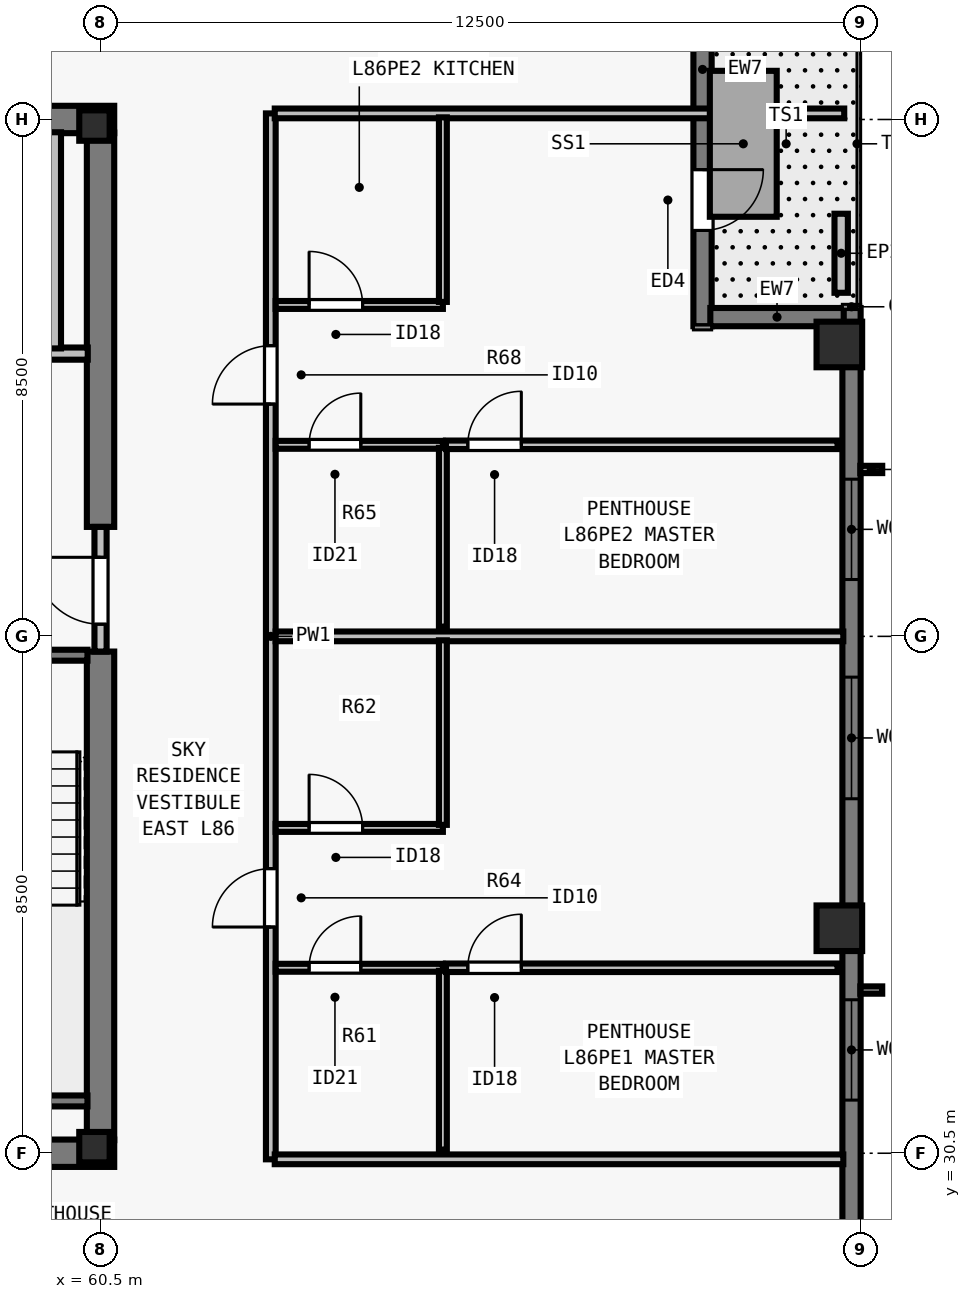
"""IFC4 building model, lengths in metres.
Left out: names, types, materials, properties, quantities, classifications, styles, units other than length and angle.
Written with IfcOpenShell. Run it as: python <this file> out.ifc"""

import sys

from ifc_helpers import new_model, si_unit, direction, frame, frame_2d, origin, origin_2d, place, context, subcontext, project, spatial, rectangle, i_section, extrude, element, fill, save


model = new_model("IFC4")
c1 = context("Model", 3, precision=1e-05, world=origin(), true_north=direction((0.0, 1.0)))
c2 = subcontext(c1, "Body", "Model", "MODEL_VIEW")
j1 = project(units=[si_unit("LENGTHUNIT", "METRE"), si_unit("PLANEANGLEUNIT", "RADIAN")], contexts=[c1])
p1 = place(None, origin())
s1 = spatial("IfcSite", under=j1, at=p1, CompositionType="ELEMENT")
p2 = place(p1, origin())
s2 = spatial("IfcBuilding", under=s1, at=p2, CompositionType="ELEMENT")
p3 = place(p2, frame((0.0, 0.0, 312.0)))
s3 = spatial("IfcBuildingStorey", under=s2, at=p3, CompositionType="ELEMENT", Elevation=312.0)
for number, where, z_axis, x_axis in (
    (1, (60.4, 30.6, 0.0), (0.0, 0.0, 1.0), (1.0, 0.0, 0.0)),
    (2, (60.4, 47.4, 0.0), (0.0, 0.0, 1.0), (1.0, 0.0, 0.0)),
):
    element("IfcColumn", number, at=place(p3, frame(where, z_axis=z_axis, x_axis=x_axis)), inside=s3, PredefinedType="COLUMN", context=c2, shape_type="SweptSolid", body=[
        extrude(i_section(OverallWidth=0.5, OverallDepth=0.5, WebThickness=0.028, FlangeThickness=0.045, at=origin_2d()), origin(), (0.0, 0.0, 1.0), 3.5),
    ])
for number, where, z_axis, x_axis in (
    (3, (72.65, 34.2, 0.0), (0.0, 0.0, 1.0), (0.0, 1.0, 0.0)),
    (4, (72.65, 43.8, 0.0), (0.0, 0.0, 1.0), (0.0, 1.0, 0.0)),
):
    element("IfcColumn", number, at=place(p3, frame(where, z_axis=z_axis, x_axis=x_axis)), inside=s3, PredefinedType="COLUMN", context=c2, shape_type="SweptSolid", body=[
        extrude(rectangle(XDim=0.75, YDim=0.75, at=origin_2d()), origin(), (0.0, 0.0, 1.0), 3.5),
    ])
p4 = place(p3, frame((72.85, 44.4, 0.0), z_axis=(0.0, 0.0, 1.0), x_axis=(0.0, -1.0, 0.0)))
e5 = element("IfcWall", 5, at=p4, inside=s3, PredefinedType="SOLIDWALL", context=c2, shape_type="SweptSolid", body=[
    extrude(rectangle(XDim=20.622, YDim=0.3, at=frame_2d((10.311, 0.0))), origin(), (0.0, 0.0, 1.0), 3.29),
])
p5 = place(p4, frame((2.815, 0.0, 0.8)))
e6 = element("IfcOpeningElement", 6, at=p5, cuts=e5, PredefinedType="OPENING", context=c2, shape_type="SweptSolid", body=[
    extrude(rectangle(XDim=1.65, YDim=1.758, at=frame_2d((0.825, 0.879))), frame((0.0, 0.16, 0.0), z_axis=(0.0, -1.0, 0.0), x_axis=(1.0, 0.0, 0.0)), (0.0, 0.0, 1.0), 0.32),
])
p6 = place(p4, frame((6.071, 0.0, 0.8)))
e7 = element("IfcOpeningElement", 7, at=p6, cuts=e5, PredefinedType="OPENING", context=c2, shape_type="SweptSolid", body=[
    extrude(rectangle(XDim=2.0, YDim=1.758, at=frame_2d((1.0, 0.879))), frame((0.0, 0.16, 0.0), z_axis=(0.0, -1.0, 0.0), x_axis=(1.0, 0.0, 0.0)), (0.0, 0.0, 1.0), 0.32),
])
p7 = place(p4, frame((11.376, 0.0, 0.8)))
e8 = element("IfcOpeningElement", 8, at=p7, cuts=e5, PredefinedType="OPENING", context=c2, shape_type="SweptSolid", body=[
    extrude(rectangle(XDim=1.65, YDim=1.758, at=frame_2d((0.825, 0.879))), frame((0.0, 0.16, 0.0), z_axis=(0.0, -1.0, 0.0), x_axis=(1.0, 0.0, 0.0)), (0.0, 0.0, 1.0), 0.32),
])
p8 = place(p3, frame((70.4, 49.822, 0.0), z_axis=(0.0, 0.0, 1.0), x_axis=(0.0, -1.0, 0.0)))
e9 = element("IfcWall", 9, at=p8, inside=s3, PredefinedType="SOLIDWALL", context=c2, shape_type="SweptSolid", body=[
    extrude(rectangle(XDim=5.722, YDim=0.3, at=frame_2d((2.861, 0.0))), origin(), (0.0, 0.0, 1.0), 3.29),
])
p9 = place(p8, frame((3.147, 0.0, 0.0)))
e10 = element("IfcOpeningElement", 10, at=p9, cuts=e9, PredefinedType="OPENING", context=c2, shape_type="SweptSolid", body=[
    extrude(rectangle(XDim=1.0, YDim=2.15, at=frame_2d((0.5, 1.075))), frame((0.0, 0.16, 0.0), z_axis=(0.0, -1.0, 0.0), x_axis=(1.0, 0.0, 0.0)), (0.0, 0.0, 1.0), 0.32),
])
p10 = place(p3, frame((70.528, 44.25, 0.0), z_axis=(0.0, 0.0, 1.0), x_axis=(1.0, 0.0, 0.0)))
e11 = element("IfcWall", 11, at=p10, inside=s3, PredefinedType="SOLIDWALL", context=c2, shape_type="SweptSolid", body=[
    extrude(rectangle(XDim=2.194, YDim=0.3, at=frame_2d((1.097, 0.0))), origin(), (0.0, 0.0, 1.0), 3.29),
])
p11 = place(p3, frame((72.68, 44.65, 0.0), z_axis=(0.0, 0.0, 1.0), x_axis=(0.0, 1.0, 0.0)))
e12 = element("IfcWall", 12, at=p11, inside=s3, PredefinedType="PARAPET", context=c2, shape_type="SweptSolid", body=[
    extrude(rectangle(XDim=1.3, YDim=0.22, at=frame_2d((0.65, 0.0))), origin(), (0.0, 0.0, 1.0), 0.55),
])
for number, where, z_axis, x_axis in (
    (13, (43.275, 30.5, 0.0), (0.0, 0.0, 1.0), (1.0, 0.0, 0.0)),
    (14, (43.275, 47.5, 0.0), (0.0, 0.0, 1.0), (1.0, 0.0, 0.0)),
):
    element("IfcWall", number, at=place(p3, frame(where, z_axis=z_axis, x_axis=x_axis)), inside=s3, PredefinedType="SHEAR", context=c2, shape_type="SweptSolid", body=[
        extrude(rectangle(XDim=17.45, YDim=0.45, at=frame_2d((8.725, 0.0))), origin(), (0.0, 0.0, 1.0), 3.29),
    ])
p12 = place(p3, frame((60.5, 30.715, 0.0), z_axis=(0.0, 0.0, 1.0), x_axis=(0.0, 1.0, 0.0)))
e15 = element("IfcWall", 15, at=p12, inside=s3, PredefinedType="SHEAR", context=c2, shape_type="SweptSolid", body=[
    extrude(rectangle(XDim=8.035, YDim=0.45, at=frame_2d((4.018, 0.0))), origin(), (0.0, 0.0, 1.0), 3.29),
])
p13 = place(p3, frame((60.5, 40.8, 0.0), z_axis=(0.0, 0.0, 1.0), x_axis=(0.0, 1.0, 0.0)))
e16 = element("IfcWall", 16, at=p13, inside=s3, PredefinedType="SHEAR", context=c2, shape_type="SweptSolid", body=[
    extrude(rectangle(XDim=6.485, YDim=0.45, at=frame_2d((3.242, 0.0))), origin(), (0.0, 0.0, 1.0), 3.29),
])
p14 = place(p3, frame((60.5, 38.75, 0.0), z_axis=(0.0, 0.0, 1.0), x_axis=(0.0, 1.0, 0.0)))
e17 = element("IfcWall", 17, at=p14, inside=s3, PredefinedType="SOLIDWALL", context=c2, shape_type="SweptSolid", body=[
    extrude(rectangle(XDim=2.05, YDim=0.2, at=frame_2d((1.025, 0.0))), origin(), (0.0, 0.0, 1.0), 3.29),
])
p15 = place(p14, frame((0.45, 0.0, 0.0)))
e18 = element("IfcOpeningElement", 18, at=p15, cuts=e17, PredefinedType="OPENING", context=c2, shape_type="SweptSolid", body=[
    extrude(rectangle(XDim=1.1, YDim=2.15, at=frame_2d((0.55, 1.075))), frame((0.0, 0.11, 0.0), z_axis=(0.0, -1.0, 0.0), x_axis=(1.0, 0.0, 0.0)), (0.0, 0.0, 1.0), 0.22),
])
p16 = place(p3, frame((56.735, 43.65, 0.0), z_axis=(0.0, 0.0, 1.0), x_axis=(1.0, 0.0, 0.0)))
e19 = element("IfcWall", 19, at=p16, inside=s3, PredefinedType="SOLIDWALL", context=c2, shape_type="SweptSolid", body=[
    extrude(rectangle(XDim=3.555, YDim=0.2, at=frame_2d((1.777, 0.0))), origin(), (0.0, 0.0, 1.0), 3.29),
])
p17 = place(p16, frame((1.295, 0.0, 0.0)))
e20 = element("IfcOpeningElement", 20, at=p17, cuts=e19, PredefinedType="OPENING", context=c2, shape_type="SweptSolid", body=[
    extrude(rectangle(XDim=1.1, YDim=2.2, at=frame_2d((0.55, 1.1))), frame((0.0, 0.11, 0.0), z_axis=(0.0, -1.0, 0.0), x_axis=(1.0, 0.0, 0.0)), (0.0, 0.0, 1.0), 0.22),
])
p18 = place(p3, frame((59.75, 43.735, 0.0), z_axis=(0.0, 0.0, 1.0), x_axis=(0.0, 1.0, 0.0)))
e21 = element("IfcWall", 21, at=p18, inside=s3, PredefinedType="SOLIDWALL", context=c2, shape_type="SweptSolid", body=[
    extrude(rectangle(XDim=3.555, YDim=0.2, at=frame_2d((1.777, 0.0))), origin(), (0.0, 0.0, 1.0), 3.29),
])
p19 = place(p3, frame((63.3, 30.4, 0.0), z_axis=(0.0, 0.0, 1.0), x_axis=(0.0, 1.0, 0.0)))
e22 = element("IfcWall", 22, at=p19, inside=s3, PredefinedType="PARTITIONING", context=c2, shape_type="SweptSolid", body=[
    extrude(rectangle(XDim=17.2, YDim=0.16, at=frame_2d((8.6, 0.0))), origin(), (0.0, 0.0, 1.0), 3.29),
])
p20 = place(p19, frame((3.82, 0.0, 0.0)))
e23 = element("IfcOpeningElement", 23, at=p20, cuts=e22, PredefinedType="OPENING", context=c2, shape_type="SweptSolid", body=[
    extrude(rectangle(XDim=0.96, YDim=2.18, at=frame_2d((0.48, 1.09))), frame((0.0, 0.09, 0.0), z_axis=(0.0, -1.0, 0.0), x_axis=(1.0, 0.0, 0.0)), (0.0, 0.0, 1.0), 0.18),
])
p21 = place(p19, frame((12.42, 0.0, 0.0)))
e24 = element("IfcOpeningElement", 24, at=p21, cuts=e22, PredefinedType="OPENING", context=c2, shape_type="SweptSolid", body=[
    extrude(rectangle(XDim=0.96, YDim=2.18, at=frame_2d((0.48, 1.09))), frame((0.0, 0.09, 0.0), z_axis=(0.0, -1.0, 0.0), x_axis=(1.0, 0.0, 0.0)), (0.0, 0.0, 1.0), 0.18),
])
p22 = place(p3, frame((63.365, 30.4, 0.0), z_axis=(0.0, 0.0, 1.0), x_axis=(1.0, 0.0, 0.0)))
e25 = element("IfcWall", 25, at=p22, inside=s3, PredefinedType="PARTITIONING", context=c2, shape_type="SweptSolid", body=[
    extrude(rectangle(XDim=9.35, YDim=0.16, at=frame_2d((4.675, 0.0))), origin(), (0.0, 0.0, 1.0), 3.29),
])
p23 = place(p3, frame((63.365, 47.6, 0.0), z_axis=(0.0, 0.0, 1.0), x_axis=(1.0, 0.0, 0.0)))
e26 = element("IfcWall", 26, at=p23, inside=s3, PredefinedType="PARTITIONING", context=c2, shape_type="SweptSolid", body=[
    extrude(rectangle(XDim=9.365, YDim=0.16, at=frame_2d((4.683, 0.0))), origin(), (0.0, 0.0, 1.0), 3.29),
])
p24 = place(p3, frame((63.38, 39.0, 0.0), z_axis=(0.0, 0.0, 1.0), x_axis=(1.0, 0.0, 0.0)))
e27 = element("IfcWall", 27, at=p24, inside=s3, PredefinedType="PARTITIONING", context=c2, shape_type="SweptSolid", body=[
    extrude(rectangle(XDim=9.335, YDim=0.16, at=frame_2d((4.667, 0.0))), origin(), (0.0, 0.0, 1.0), 3.29),
])
p25 = place(p3, frame((63.38, 33.55, 0.0), z_axis=(0.0, 0.0, 1.0), x_axis=(1.0, 0.0, 0.0)))
e28 = element("IfcWall", 28, at=p25, inside=s3, PredefinedType="PLUMBINGWALL", context=c2, shape_type="SweptSolid", body=[
    extrude(rectangle(XDim=2.75, YDim=0.13, at=frame_2d((1.375, 0.0))), origin(), (0.0, 0.0, 1.0), 3.29),
])
p26 = place(p25, frame((0.55, 0.0, 0.0)))
e29 = element("IfcOpeningElement", 29, at=p26, cuts=e28, PredefinedType="OPENING", context=c2, shape_type="SweptSolid", body=[
    extrude(rectangle(XDim=0.85, YDim=2.08, at=frame_2d((0.425, 1.04))), frame((0.0, 0.075, 0.0), z_axis=(0.0, -1.0, 0.0), x_axis=(1.0, 0.0, 0.0)), (0.0, 0.0, 1.0), 0.15),
])
p27 = place(p3, frame((66.13, 30.56, 0.0), z_axis=(0.0, 0.0, 1.0), x_axis=(0.0, 1.0, 0.0)))
e30 = element("IfcWall", 30, at=p27, inside=s3, PredefinedType="PLUMBINGWALL", context=c2, shape_type="SweptSolid", body=[
    extrude(rectangle(XDim=2.94, YDim=0.13, at=frame_2d((1.47, 0.0))), origin(), (0.0, 0.0, 1.0), 3.29),
])
p28 = place(p3, frame((63.38, 35.85, 0.0), z_axis=(0.0, 0.0, 1.0), x_axis=(1.0, 0.0, 0.0)))
e31 = element("IfcWall", 31, at=p28, inside=s3, PredefinedType="PLUMBINGWALL", context=c2, shape_type="SweptSolid", body=[
    extrude(rectangle(XDim=2.75, YDim=0.13, at=frame_2d((1.375, 0.0))), origin(), (0.0, 0.0, 1.0), 3.29),
])
p29 = place(p28, frame((0.55, 0.0, 0.0)))
e32 = element("IfcOpeningElement", 32, at=p29, cuts=e31, PredefinedType="OPENING", context=c2, shape_type="SweptSolid", body=[
    extrude(rectangle(XDim=0.88, YDim=2.1, at=frame_2d((0.44, 1.05))), frame((0.0, 0.075, 0.0), z_axis=(0.0, -1.0, 0.0), x_axis=(1.0, 0.0, 0.0)), (0.0, 0.0, 1.0), 0.15),
])
p30 = place(p3, frame((66.13, 35.9, 0.0), z_axis=(0.0, 0.0, 1.0), x_axis=(0.0, 1.0, 0.0)))
e33 = element("IfcWall", 33, at=p30, inside=s3, PredefinedType="PLUMBINGWALL", context=c2, shape_type="SweptSolid", body=[
    extrude(rectangle(XDim=3.035, YDim=0.13, at=frame_2d((1.518, 0.0))), origin(), (0.0, 0.0, 1.0), 3.29),
])
p31 = place(p3, frame((66.18, 33.55, 0.0), z_axis=(0.0, 0.0, 1.0), x_axis=(1.0, 0.0, 0.0)))
e34 = element("IfcWall", 34, at=p31, inside=s3, PredefinedType="PARTITIONING", context=c2, shape_type="SweptSolid", body=[
    extrude(rectangle(XDim=6.44, YDim=0.14, at=frame_2d((3.22, 0.0))), origin(), (0.0, 0.0, 1.0), 2.653),
])
p32 = place(p31, frame((0.36, 0.0, 0.0)))
e35 = element("IfcOpeningElement", 35, at=p32, cuts=e34, PredefinedType="OPENING", context=c2, shape_type="SweptSolid", body=[
    extrude(rectangle(XDim=0.88, YDim=2.1, at=frame_2d((0.44, 1.05))), frame((0.0, 0.08, 0.0), z_axis=(0.0, -1.0, 0.0), x_axis=(1.0, 0.0, 0.0)), (0.0, 0.0, 1.0), 0.16),
])
p33 = place(p3, frame((63.38, 42.15, 0.0), z_axis=(0.0, 0.0, 1.0), x_axis=(1.0, 0.0, 0.0)))
e36 = element("IfcWall", 36, at=p33, inside=s3, PredefinedType="PLUMBINGWALL", context=c2, shape_type="SweptSolid", body=[
    extrude(rectangle(XDim=2.75, YDim=0.13, at=frame_2d((1.375, 0.0))), origin(), (0.0, 0.0, 1.0), 3.29),
])
p34 = place(p33, frame((0.55, 0.0, 0.0)))
e37 = element("IfcOpeningElement", 37, at=p34, cuts=e36, PredefinedType="OPENING", context=c2, shape_type="SweptSolid", body=[
    extrude(rectangle(XDim=0.85, YDim=2.08, at=frame_2d((0.425, 1.04))), frame((0.0, 0.075, 0.0), z_axis=(0.0, -1.0, 0.0), x_axis=(1.0, 0.0, 0.0)), (0.0, 0.0, 1.0), 0.15),
])
p35 = place(p3, frame((66.13, 39.16, 0.0), z_axis=(0.0, 0.0, 1.0), x_axis=(0.0, 1.0, 0.0)))
e38 = element("IfcWall", 38, at=p35, inside=s3, PredefinedType="PLUMBINGWALL", context=c2, shape_type="SweptSolid", body=[
    extrude(rectangle(XDim=2.94, YDim=0.13, at=frame_2d((1.47, 0.0))), origin(), (0.0, 0.0, 1.0), 3.29),
])
p36 = place(p3, frame((63.38, 44.45, 0.0), z_axis=(0.0, 0.0, 1.0), x_axis=(1.0, 0.0, 0.0)))
e39 = element("IfcWall", 39, at=p36, inside=s3, PredefinedType="PLUMBINGWALL", context=c2, shape_type="SweptSolid", body=[
    extrude(rectangle(XDim=2.75, YDim=0.13, at=frame_2d((1.375, 0.0))), origin(), (0.0, 0.0, 1.0), 3.29),
])
p37 = place(p36, frame((0.55, 0.0, 0.0)))
e40 = element("IfcOpeningElement", 40, at=p37, cuts=e39, PredefinedType="OPENING", context=c2, shape_type="SweptSolid", body=[
    extrude(rectangle(XDim=0.88, YDim=2.1, at=frame_2d((0.44, 1.05))), frame((0.0, 0.075, 0.0), z_axis=(0.0, -1.0, 0.0), x_axis=(1.0, 0.0, 0.0)), (0.0, 0.0, 1.0), 0.15),
])
p38 = place(p3, frame((66.13, 44.5, 0.0), z_axis=(0.0, 0.0, 1.0), x_axis=(0.0, 1.0, 0.0)))
e41 = element("IfcWall", 41, at=p38, inside=s3, PredefinedType="PLUMBINGWALL", context=c2, shape_type="SweptSolid", body=[
    extrude(rectangle(XDim=3.035, YDim=0.13, at=frame_2d((1.518, 0.0))), origin(), (0.0, 0.0, 1.0), 3.29),
])
p39 = place(p3, frame((66.18, 42.15, 0.0), z_axis=(0.0, 0.0, 1.0), x_axis=(1.0, 0.0, 0.0)))
e42 = element("IfcWall", 42, at=p39, inside=s3, PredefinedType="PARTITIONING", context=c2, shape_type="SweptSolid", body=[
    extrude(rectangle(XDim=6.44, YDim=0.14, at=frame_2d((3.22, 0.0))), origin(), (0.0, 0.0, 1.0), 3.29),
])
p40 = place(p39, frame((0.36, 0.0, 0.0)))
e43 = element("IfcOpeningElement", 43, at=p40, cuts=e42, PredefinedType="OPENING", context=c2, shape_type="SweptSolid", body=[
    extrude(rectangle(XDim=0.88, YDim=2.1, at=frame_2d((0.44, 1.05))), frame((0.0, 0.08, 0.0), z_axis=(0.0, -1.0, 0.0), x_axis=(1.0, 0.0, 0.0)), (0.0, 0.0, 1.0), 0.16),
])
p41 = place(p3, frame((57.005, 38.69, 0.0), z_axis=(0.0, 0.0, 1.0), x_axis=(1.0, 0.0, 0.0)))
e44 = element("IfcWall", 44, at=p41, inside=s3, PredefinedType="SOLIDWALL", context=c2, shape_type="SweptSolid", body=[
    extrude(rectangle(XDim=3.28, YDim=0.18, at=frame_2d((1.64, 0.0))), origin(), (0.0, 0.0, 1.0), 3.29),
])
p42 = place(p41, frame((1.165, 0.0, 0.0)))
e45 = element("IfcOpeningElement", 45, at=p42, cuts=e44, PredefinedType="OPENING", context=c2, shape_type="SweptSolid", body=[
    extrude(rectangle(XDim=0.95, YDim=2.15, at=frame_2d((0.475, 1.075))), frame((0.0, 0.1, 0.0), z_axis=(0.0, -1.0, 0.0), x_axis=(1.0, 0.0, 0.0)), (0.0, 0.0, 1.0), 0.2),
])
p43 = place(p3, frame((57.005, 31.36, 0.0), z_axis=(0.0, 0.0, 1.0), x_axis=(1.0, 0.0, 0.0)))
e46 = element("IfcWall", 46, at=p43, inside=s3, PredefinedType="SOLIDWALL", context=c2, shape_type="SweptSolid", body=[
    extrude(rectangle(XDim=3.28, YDim=0.18, at=frame_2d((1.64, 0.0))), origin(), (0.0, 0.0, 1.0), 3.29),
])
p44 = place(p5, origin())
e47 = element("IfcWindow", 47, at=p44, inside=s3, PartitioningType="SINGLE_PANEL", PredefinedType="WINDOW", context=c2, shape_type="SweptSolid", body=[
    extrude(rectangle(XDim=1.65, YDim=1.758, at=frame_2d((0.825, 0.879))), frame((0.0, -0.05, 0.0), z_axis=(0.0, -1.0, 0.0), x_axis=(1.0, 0.0, 0.0)), (0.0, 0.0, 1.0), 0.06),
])
fill(e6, e47)
p45 = place(p6, origin())
e48 = element("IfcWindow", 48, at=p45, inside=s3, PartitioningType="SINGLE_PANEL", PredefinedType="WINDOW", context=c2, shape_type="SweptSolid", body=[
    extrude(rectangle(XDim=2.0, YDim=1.758, at=frame_2d((1.0, 0.879))), frame((0.0, -0.05, 0.0), z_axis=(0.0, -1.0, 0.0), x_axis=(1.0, 0.0, 0.0)), (0.0, 0.0, 1.0), 0.06),
])
fill(e7, e48)
p46 = place(p7, origin())
e49 = element("IfcWindow", 49, at=p46, inside=s3, PartitioningType="SINGLE_PANEL", PredefinedType="WINDOW", context=c2, shape_type="SweptSolid", body=[
    extrude(rectangle(XDim=1.65, YDim=1.758, at=frame_2d((0.825, 0.879))), frame((0.0, -0.05, 0.0), z_axis=(0.0, -1.0, 0.0), x_axis=(1.0, 0.0, 0.0)), (0.0, 0.0, 1.0), 0.06),
])
fill(e8, e49)
p47 = place(p9, origin())
e50 = element("IfcDoor", 50, at=p47, inside=s3, OperationType="SINGLE_SWING_LEFT", PredefinedType="DOOR", context=c2, shape_type="SweptSolid", body=[
    extrude(rectangle(XDim=1.0, YDim=2.15, at=frame_2d((0.5, 1.075))), frame((0.0, 0.025, 0.0), z_axis=(0.0, -1.0, 0.0), x_axis=(1.0, 0.0, 0.0)), (0.0, 0.0, 1.0), 0.05),
])
fill(e10, e50)
p48 = place(p15, origin())
e51 = element("IfcDoor", 51, at=p48, inside=s3, OperationType="SINGLE_SWING_RIGHT", PredefinedType="DOOR", context=c2, shape_type="SweptSolid", body=[
    extrude(rectangle(XDim=1.1, YDim=2.15, at=frame_2d((0.55, 1.075))), frame((0.0, 0.025, 0.0), z_axis=(0.0, -1.0, 0.0), x_axis=(1.0, 0.0, 0.0)), (0.0, 0.0, 1.0), 0.05),
])
fill(e18, e51)
p49 = place(p26, origin())
e52 = element("IfcDoor", 52, at=p49, inside=s3, OperationType="SINGLE_SWING_RIGHT", PredefinedType="DOOR", context=c2, shape_type="SweptSolid", body=[
    extrude(rectangle(XDim=0.85, YDim=2.08, at=frame_2d((0.425, 1.04))), frame((0.0, 0.025, 0.0), z_axis=(0.0, -1.0, 0.0), x_axis=(1.0, 0.0, 0.0)), (0.0, 0.0, 1.0), 0.05),
])
fill(e29, e52)
p50 = place(p29, origin())
e53 = element("IfcDoor", 53, at=p50, inside=s3, OperationType="SINGLE_SWING_LEFT", PredefinedType="DOOR", context=c2, shape_type="SweptSolid", body=[
    extrude(rectangle(XDim=0.88, YDim=2.1, at=frame_2d((0.44, 1.05))), frame((0.0, 0.025, 0.0), z_axis=(0.0, -1.0, 0.0), x_axis=(1.0, 0.0, 0.0)), (0.0, 0.0, 1.0), 0.05),
])
fill(e32, e53)
p51 = place(p32, origin())
e54 = element("IfcDoor", 54, at=p51, inside=s3, OperationType="SINGLE_SWING_RIGHT", PredefinedType="DOOR", context=c2, shape_type="SweptSolid", body=[
    extrude(rectangle(XDim=0.88, YDim=2.1, at=frame_2d((0.44, 1.05))), frame((0.0, 0.025, 0.0), z_axis=(0.0, -1.0, 0.0), x_axis=(1.0, 0.0, 0.0)), (0.0, 0.0, 1.0), 0.05),
])
fill(e35, e54)
p52 = place(p20, origin())
e55 = element("IfcDoor", 55, at=p52, inside=s3, OperationType="SINGLE_SWING_LEFT", PredefinedType="DOOR", context=c2, shape_type="SweptSolid", body=[
    extrude(rectangle(XDim=0.96, YDim=2.18, at=frame_2d((0.48, 1.09))), frame((0.0, 0.025, 0.0), z_axis=(0.0, -1.0, 0.0), x_axis=(1.0, 0.0, 0.0)), (0.0, 0.0, 1.0), 0.05),
])
fill(e23, e55)
p53 = place(p34, origin())
e56 = element("IfcDoor", 56, at=p53, inside=s3, OperationType="SINGLE_SWING_RIGHT", PredefinedType="DOOR", context=c2, shape_type="SweptSolid", body=[
    extrude(rectangle(XDim=0.85, YDim=2.08, at=frame_2d((0.425, 1.04))), frame((0.0, 0.025, 0.0), z_axis=(0.0, -1.0, 0.0), x_axis=(1.0, 0.0, 0.0)), (0.0, 0.0, 1.0), 0.05),
])
fill(e37, e56)
p54 = place(p37, origin())
e57 = element("IfcDoor", 57, at=p54, inside=s3, OperationType="SINGLE_SWING_LEFT", PredefinedType="DOOR", context=c2, shape_type="SweptSolid", body=[
    extrude(rectangle(XDim=0.88, YDim=2.1, at=frame_2d((0.44, 1.05))), frame((0.0, 0.025, 0.0), z_axis=(0.0, -1.0, 0.0), x_axis=(1.0, 0.0, 0.0)), (0.0, 0.0, 1.0), 0.05),
])
fill(e40, e57)
p55 = place(p40, origin())
e58 = element("IfcDoor", 58, at=p55, inside=s3, OperationType="SINGLE_SWING_RIGHT", PredefinedType="DOOR", context=c2, shape_type="SweptSolid", body=[
    extrude(rectangle(XDim=0.88, YDim=2.1, at=frame_2d((0.44, 1.05))), frame((0.0, 0.025, 0.0), z_axis=(0.0, -1.0, 0.0), x_axis=(1.0, 0.0, 0.0)), (0.0, 0.0, 1.0), 0.05),
])
fill(e43, e58)
p56 = place(p21, origin())
e59 = element("IfcDoor", 59, at=p56, inside=s3, OperationType="SINGLE_SWING_LEFT", PredefinedType="DOOR", context=c2, shape_type="SweptSolid", body=[
    extrude(rectangle(XDim=0.96, YDim=2.18, at=frame_2d((0.48, 1.09))), frame((0.0, 0.025, 0.0), z_axis=(0.0, -1.0, 0.0), x_axis=(1.0, 0.0, 0.0)), (0.0, 0.0, 1.0), 0.05),
])
fill(e24, e59)
save(model, sys.argv[1])
